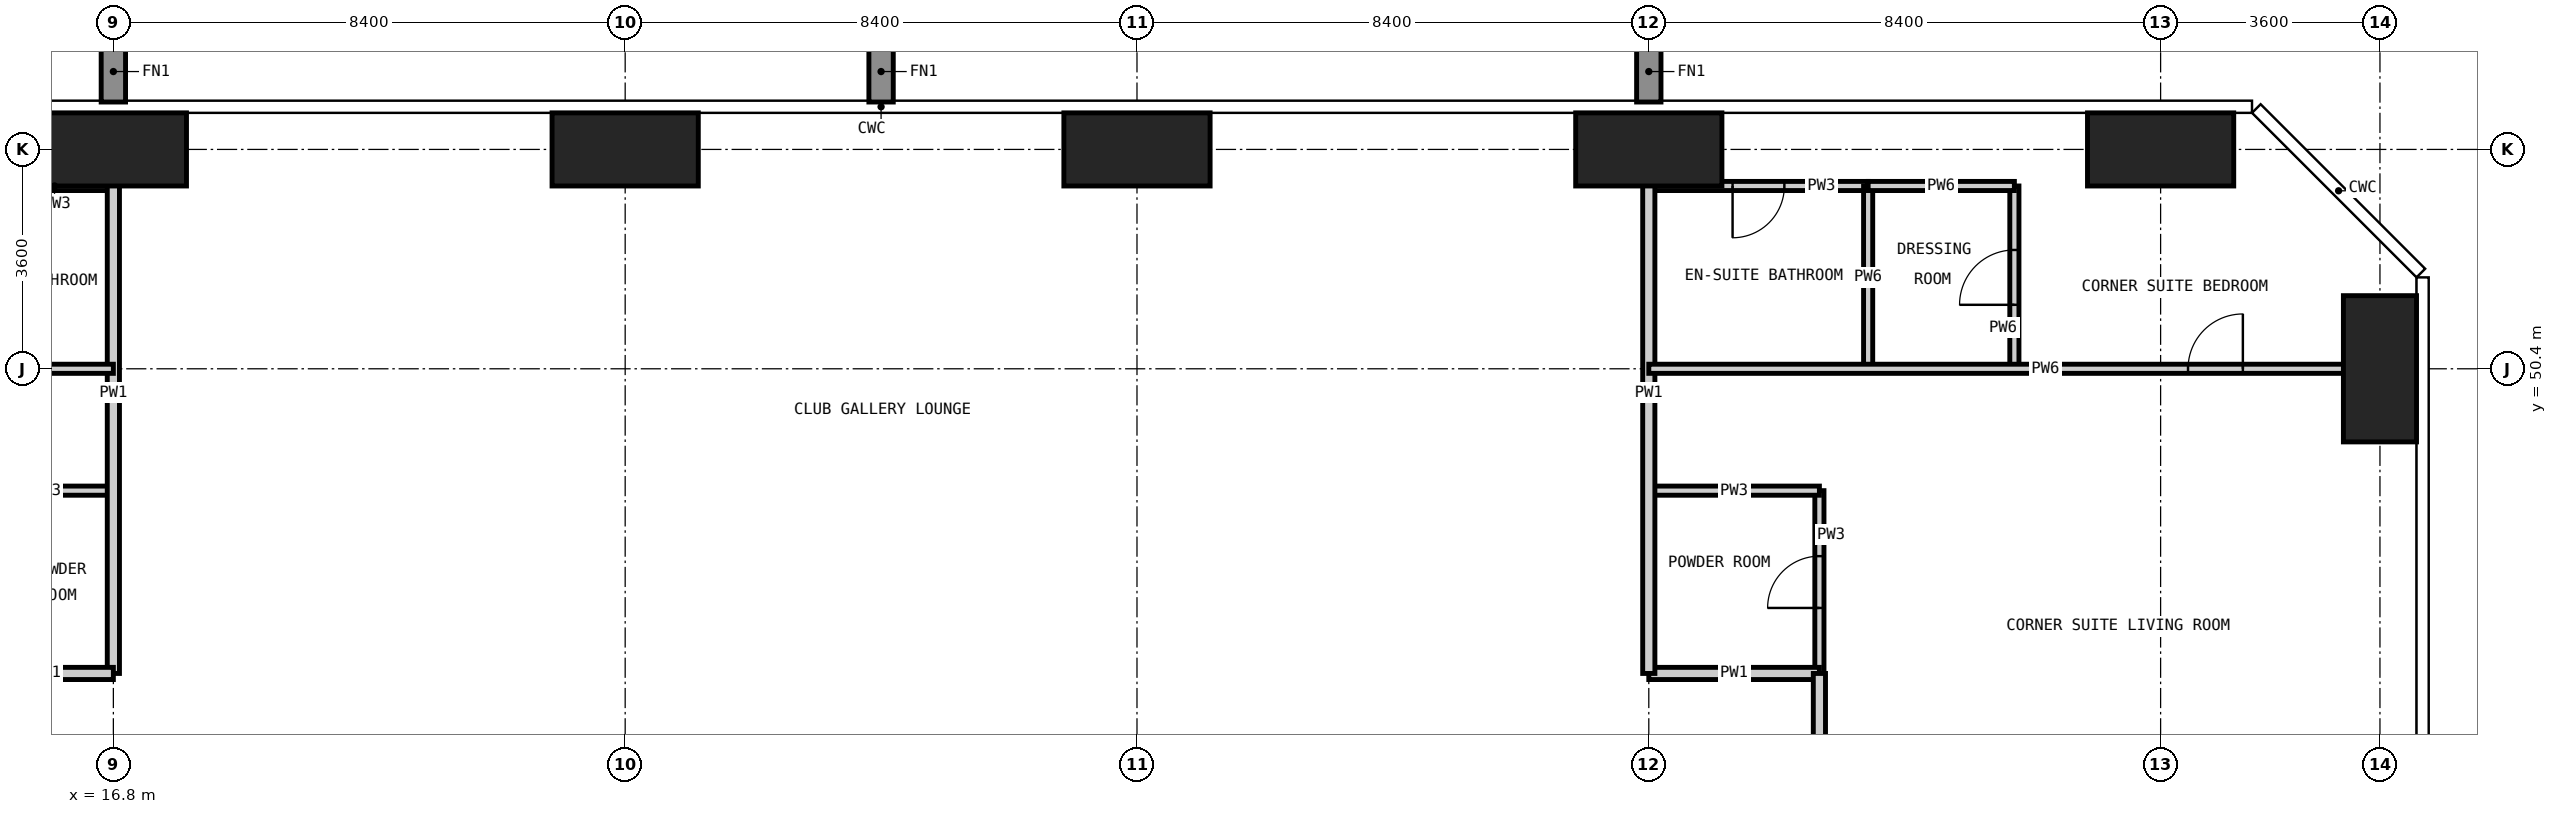
"""IFC4 building model, lengths in metres.
Left out: names, types, materials, properties, quantities, classifications, styles, units other than length and angle.
Written with IfcOpenShell. Run it as: python <this file> out.ifc"""

import sys

from ifc_helpers import new_model, si_unit, direction, frame, frame_2d, origin, origin_2d, place, context, subcontext, project, spatial, rectangle, extrude, element, fill, save


model = new_model("IFC4")
c1 = context("Model", 3, precision=1e-05, world=origin(), true_north=direction((0.0, 1.0)))
c2 = subcontext(c1, "Body", "Model", "MODEL_VIEW")
j1 = project(units=[si_unit("LENGTHUNIT", "METRE"), si_unit("PLANEANGLEUNIT", "RADIAN")], contexts=[c1])
p1 = place(None, origin())
s1 = spatial("IfcSite", under=j1, at=p1, CompositionType="ELEMENT")
p2 = place(p1, origin())
s2 = spatial("IfcBuilding", under=s1, at=p2, CompositionType="ELEMENT")
p3 = place(p2, frame((0.0, 0.0, 205.8)))
s3 = spatial("IfcBuildingStorey", under=s2, at=p3, CompositionType="ELEMENT", Elevation=205.8)
for number, where, z_axis, x_axis in (
    (1, (16.8, 54.0, -0.35), (0.0, 0.0, 1.0), (1.0, 0.0, 0.0)),
    (2, (25.2, 54.0, -0.35), (0.0, 0.0, 1.0), (1.0, 0.0, 0.0)),
    (3, (33.6, 54.0, -0.35), (0.0, 0.0, 1.0), (1.0, 0.0, 0.0)),
    (4, (42.0, 54.0, -0.35), (0.0, 0.0, 1.0), (1.0, 0.0, 0.0)),
    (5, (50.4, 54.0, -0.35), (0.0, 0.0, 1.0), (1.0, 0.0, 0.0)),
):
    element("IfcColumn", number, at=place(p3, frame(where, z_axis=z_axis, x_axis=x_axis)), inside=s3, PredefinedType="COLUMN", context=c2, shape_type="SweptSolid", body=[
        extrude(rectangle(XDim=2.4, YDim=1.2, at=origin_2d()), origin(), (0.0, 0.0, 1.0), 3.6),
    ])
p4 = place(p3, frame((54.0, 50.4, -0.35), z_axis=(0.0, 0.0, 1.0), x_axis=(1.0, 0.0, 0.0)))
e6 = element("IfcColumn", 6, at=p4, inside=s3, PredefinedType="COLUMN", context=c2, shape_type="SweptSolid", body=[
    extrude(rectangle(XDim=1.2, YDim=2.4, at=origin_2d()), origin(), (0.0, 0.0, 1.0), 3.6),
])
p5 = place(p3, frame((44.8, 45.4, 0.0), z_axis=(0.0, 0.0, 1.0), x_axis=(0.0, 1.0, 0.0)))
e7 = element("IfcWall", 7, at=p5, inside=s3, PredefinedType="PARTITIONING", context=c2, shape_type="SweptSolid", body=[
    extrude(rectangle(XDim=3.0, YDim=0.15, at=frame_2d((1.5, 0.0))), origin(), (0.0, 0.0, 1.0), 3.25),
])
p6 = place(p5, frame((1.075, 0.0, 0.0)))
e8 = element("IfcOpeningElement", 8, at=p6, cuts=e7, PredefinedType="OPENING", context=c2, shape_type="SweptSolid", body=[
    extrude(rectangle(XDim=0.85, YDim=2.1, at=frame_2d((0.425, 1.05))), frame((0.0, 0.085, 0.0), z_axis=(0.0, -1.0, 0.0), x_axis=(1.0, 0.0, 0.0)), (0.0, 0.0, 1.0), 0.17),
])
p7 = place(p3, frame((14.6, 48.4, 0.0), z_axis=(0.0, 0.0, 1.0), x_axis=(1.0, 0.0, 0.0)))
e9 = element("IfcWall", 9, at=p7, inside=s3, PredefinedType="PARTITIONING", context=c2, shape_type="SweptSolid", body=[
    extrude(rectangle(XDim=2.2, YDim=0.15, at=frame_2d((1.1, 0.0))), origin(), (0.0, 0.0, 1.0), 3.25),
])
p8 = place(p3, frame((42.0, 48.4, 0.0), z_axis=(0.0, 0.0, 1.0), x_axis=(1.0, 0.0, 0.0)))
e10 = element("IfcWall", 10, at=p8, inside=s3, PredefinedType="PARTITIONING", context=c2, shape_type="SweptSolid", body=[
    extrude(rectangle(XDim=2.8, YDim=0.15, at=frame_2d((1.4, 0.0))), origin(), (0.0, 0.0, 1.0), 3.25),
])
p9 = place(p3, frame((13.2, 53.4, 0.0), z_axis=(0.0, 0.0, 1.0), x_axis=(1.0, 0.0, 0.0)))
e11 = element("IfcWall", 11, at=p9, inside=s3, PredefinedType="PARTITIONING", context=c2, shape_type="SweptSolid", body=[
    extrude(rectangle(XDim=3.6, YDim=0.15, at=frame_2d((1.8, 0.0))), origin(), (0.0, 0.0, 1.0), 3.25),
])
p10 = place(p9, frame((1.375, 0.0, 0.0)))
e12 = element("IfcOpeningElement", 12, at=p10, cuts=e11, PredefinedType="OPENING", context=c2, shape_type="SweptSolid", body=[
    extrude(rectangle(XDim=0.85, YDim=2.1, at=frame_2d((0.425, 1.05))), frame((0.0, 0.085, 0.0), z_axis=(0.0, -1.0, 0.0), x_axis=(1.0, 0.0, 0.0)), (0.0, 0.0, 1.0), 0.17),
])
p11 = place(p3, frame((42.0, 53.4, 0.0), z_axis=(0.0, 0.0, 1.0), x_axis=(1.0, 0.0, 0.0)))
e13 = element("IfcWall", 13, at=p11, inside=s3, PredefinedType="PARTITIONING", context=c2, shape_type="SweptSolid", body=[
    extrude(rectangle(XDim=3.6, YDim=0.15, at=frame_2d((1.8, 0.0))), origin(), (0.0, 0.0, 1.0), 3.25),
])
p12 = place(p11, frame((1.375, 0.0, 0.0)))
e14 = element("IfcOpeningElement", 14, at=p12, cuts=e13, PredefinedType="OPENING", context=c2, shape_type="SweptSolid", body=[
    extrude(rectangle(XDim=0.85, YDim=2.1, at=frame_2d((0.425, 1.05))), frame((0.0, 0.085, 0.0), z_axis=(0.0, -1.0, 0.0), x_axis=(1.0, 0.0, 0.0)), (0.0, 0.0, 1.0), 0.17),
])
p13 = place(p3, frame((16.8, 45.4, 0.0), z_axis=(0.0, 0.0, 1.0), x_axis=(0.0, 1.0, 0.0)))
e15 = element("IfcWall", 15, at=p13, inside=s3, PredefinedType="PARTITIONING", context=c2, shape_type="SweptSolid", body=[
    extrude(rectangle(XDim=9.218, YDim=0.2, at=frame_2d((4.609, 0.0))), origin(), (0.0, 0.0, 1.0), 3.25),
])
p14 = place(p3, frame((14.6, 45.4, 0.0), z_axis=(0.0, 0.0, 1.0), x_axis=(1.0, 0.0, 0.0)))
e16 = element("IfcWall", 16, at=p14, inside=s3, PredefinedType="PARTITIONING", context=c2, shape_type="SweptSolid", body=[
    extrude(rectangle(XDim=2.2, YDim=0.2, at=frame_2d((1.1, 0.0))), origin(), (0.0, 0.0, 1.0), 3.25),
])
p15 = place(p3, frame((42.0, 45.4, 0.0), z_axis=(0.0, 0.0, 1.0), x_axis=(1.0, 0.0, 0.0)))
e17 = element("IfcWall", 17, at=p15, inside=s3, PredefinedType="PARTITIONING", context=c2, shape_type="SweptSolid", body=[
    extrude(rectangle(XDim=2.8, YDim=0.2, at=frame_2d((1.4, 0.0))), origin(), (0.0, 0.0, 1.0), 3.25),
])
p16 = place(p3, frame((42.0, 54.618, 0.0), z_axis=(0.0, 0.0, 1.0), x_axis=(0.0, -1.0, 0.0)))
e18 = element("IfcWall", 18, at=p16, inside=s3, PredefinedType="PARTITIONING", context=c2, shape_type="SweptSolid", body=[
    extrude(rectangle(XDim=9.218, YDim=0.2, at=frame_2d((4.609, 0.0))), origin(), (0.0, 0.0, 1.0), 3.25),
])
p17 = place(p3, frame((44.8, 45.4, 0.0), z_axis=(0.0, 0.0, 1.0), x_axis=(0.0, -1.0, 0.0)))
e19 = element("IfcWall", 19, at=p17, inside=s3, PredefinedType="PARTITIONING", context=c2, shape_type="SweptSolid", body=[
    extrude(rectangle(XDim=30.8, YDim=0.2, at=frame_2d((15.4, 0.0))), origin(), (0.0, 0.0, 1.0), 3.25),
])
p18 = place(p17, frame((26.0, 0.0, 0.0)))
e20 = element("IfcOpeningElement", 20, at=p18, cuts=e19, PredefinedType="OPENING", context=c2, shape_type="SweptSolid", body=[
    extrude(rectangle(XDim=1.0, YDim=2.2, at=frame_2d((0.5, 1.1))), frame((0.0, 0.11, 0.0), z_axis=(0.0, -1.0, 0.0), x_axis=(1.0, 0.0, 0.0)), (0.0, 0.0, 1.0), 0.22),
])
p19 = place(p17, frame((21.8, 0.0, 0.0)))
e21 = element("IfcOpeningElement", 21, at=p19, cuts=e19, PredefinedType="OPENING", context=c2, shape_type="SweptSolid", body=[
    extrude(rectangle(XDim=1.0, YDim=2.2, at=frame_2d((0.5, 1.1))), frame((0.0, 0.11, 0.0), z_axis=(0.0, -1.0, 0.0), x_axis=(1.0, 0.0, 0.0)), (0.0, 0.0, 1.0), 0.22),
])
p20 = place(p17, frame((16.7, 0.0, 0.0)))
e22 = element("IfcOpeningElement", 22, at=p20, cuts=e19, PredefinedType="OPENING", context=c2, shape_type="SweptSolid", body=[
    extrude(rectangle(XDim=1.0, YDim=2.2, at=frame_2d((0.5, 1.1))), frame((0.0, 0.11, 0.0), z_axis=(0.0, -1.0, 0.0), x_axis=(1.0, 0.0, 0.0)), (0.0, 0.0, 1.0), 0.22),
])
p21 = place(p17, frame((5.0, 0.0, 0.0)))
e23 = element("IfcOpeningElement", 23, at=p21, cuts=e19, PredefinedType="OPENING", context=c2, shape_type="SweptSolid", body=[
    extrude(rectangle(XDim=1.0, YDim=2.2, at=frame_2d((0.5, 1.1))), frame((0.0, 0.11, 0.0), z_axis=(0.0, -1.0, 0.0), x_axis=(1.0, 0.0, 0.0)), (0.0, 0.0, 1.0), 0.22),
])
p22 = place(p17, frame((29.2, 0.0, 0.0)))
e24 = element("IfcOpeningElement", 24, at=p22, cuts=e19, PredefinedType="OPENING", context=c2, shape_type="SweptSolid", body=[
    extrude(rectangle(XDim=1.0, YDim=2.2, at=frame_2d((0.5, 1.1))), frame((0.0, 0.11, 0.0), z_axis=(0.0, -1.0, 0.0), x_axis=(1.0, 0.0, 0.0)), (0.0, 0.0, 1.0), 0.22),
])
p23 = place(p17, frame((1.2, 0.0, 0.0)))
e25 = element("IfcOpeningElement", 25, at=p23, cuts=e19, PredefinedType="OPENING", context=c2, shape_type="SweptSolid", body=[
    extrude(rectangle(XDim=1.0, YDim=2.2, at=frame_2d((0.5, 1.1))), frame((0.0, 0.11, 0.0), z_axis=(0.0, -1.0, 0.0), x_axis=(1.0, 0.0, 0.0)), (0.0, 0.0, 1.0), 0.22),
])
p24 = place(p3, frame((45.6, 50.4, 0.0), z_axis=(0.0, 0.0, 1.0), x_axis=(0.0, 1.0, 0.0)))
e26 = element("IfcWall", 26, at=p24, inside=s3, PredefinedType="PARTITIONING", context=c2, shape_type="SweptSolid", body=[
    extrude(rectangle(XDim=3.0, YDim=0.15, at=frame_2d((1.5, 0.0))), origin(), (0.0, 0.0, 1.0), 3.25),
])
p25 = place(p3, frame((48.0, 50.4, 0.0), z_axis=(0.0, 0.0, 1.0), x_axis=(0.0, 1.0, 0.0)))
e27 = element("IfcWall", 27, at=p25, inside=s3, PredefinedType="PARTITIONING", context=c2, shape_type="SweptSolid", body=[
    extrude(rectangle(XDim=3.0, YDim=0.15, at=frame_2d((1.5, 0.0))), origin(), (0.0, 0.0, 1.0), 3.25),
])
p26 = place(p25, frame((1.05, 0.0, 0.0)))
e28 = element("IfcOpeningElement", 28, at=p26, cuts=e27, PredefinedType="OPENING", context=c2, shape_type="SweptSolid", body=[
    extrude(rectangle(XDim=0.9, YDim=2.1, at=frame_2d((0.45, 1.05))), frame((0.0, 0.085, 0.0), z_axis=(0.0, -1.0, 0.0), x_axis=(1.0, 0.0, 0.0)), (0.0, 0.0, 1.0), 0.17),
])
p27 = place(p3, frame((4.182, 50.4, 0.0), z_axis=(0.0, 0.0, 1.0), x_axis=(1.0, 0.0, 0.0)))
e29 = element("IfcWall", 29, at=p27, inside=s3, PredefinedType="PARTITIONING", context=c2, shape_type="SweptSolid", body=[
    extrude(rectangle(XDim=12.618, YDim=0.15, at=frame_2d((6.309, 0.0))), origin(), (0.0, 0.0, 1.0), 3.25),
])
p28 = place(p27, frame((2.868, 0.0, 0.0)))
e30 = element("IfcOpeningElement", 30, at=p28, cuts=e29, PredefinedType="OPENING", context=c2, shape_type="SweptSolid", body=[
    extrude(rectangle(XDim=0.9, YDim=2.1, at=frame_2d((0.45, 1.05))), frame((0.0, 0.085, 0.0), z_axis=(0.0, -1.0, 0.0), x_axis=(1.0, 0.0, 0.0)), (0.0, 0.0, 1.0), 0.17),
])
p29 = place(p3, frame((42.0, 50.4, 0.0), z_axis=(0.0, 0.0, 1.0), x_axis=(1.0, 0.0, 0.0)))
e31 = element("IfcWall", 31, at=p29, inside=s3, PredefinedType="PARTITIONING", context=c2, shape_type="SweptSolid", body=[
    extrude(rectangle(XDim=12.618, YDim=0.15, at=frame_2d((6.309, 0.0))), origin(), (0.0, 0.0, 1.0), 3.25),
])
p30 = place(p29, frame((8.85, 0.0, 0.0)))
e32 = element("IfcOpeningElement", 32, at=p30, cuts=e31, PredefinedType="OPENING", context=c2, shape_type="SweptSolid", body=[
    extrude(rectangle(XDim=0.9, YDim=2.1, at=frame_2d((0.45, 1.05))), frame((0.0, 0.085, 0.0), z_axis=(0.0, -1.0, 0.0), x_axis=(1.0, 0.0, 0.0)), (0.0, 0.0, 1.0), 0.17),
])
p31 = place(p3, frame((45.6, 53.4, 0.0), z_axis=(0.0, 0.0, 1.0), x_axis=(1.0, 0.0, 0.0)))
e33 = element("IfcWall", 33, at=p31, inside=s3, PredefinedType="PARTITIONING", context=c2, shape_type="SweptSolid", body=[
    extrude(rectangle(XDim=2.4, YDim=0.15, at=frame_2d((1.2, 0.0))), origin(), (0.0, 0.0, 1.0), 3.25),
])
p32 = place(p6, origin())
e34 = element("IfcDoor", 34, at=p32, inside=s3, OperationType="SINGLE_SWING_LEFT", PredefinedType="DOOR", context=c2, shape_type="SweptSolid", body=[
    extrude(rectangle(XDim=0.85, YDim=2.1, at=frame_2d((0.425, 1.05))), frame((0.0, 0.025, 0.0), z_axis=(0.0, -1.0, 0.0), x_axis=(1.0, 0.0, 0.0)), (0.0, 0.0, 1.0), 0.05),
])
fill(e8, e34)
p33 = place(p30, origin())
e35 = element("IfcDoor", 35, at=p33, inside=s3, OperationType="SINGLE_SWING_RIGHT", PredefinedType="DOOR", context=c2, shape_type="SweptSolid", body=[
    extrude(rectangle(XDim=0.9, YDim=2.1, at=frame_2d((0.45, 1.05))), frame((0.0, 0.025, 0.0), z_axis=(0.0, -1.0, 0.0), x_axis=(1.0, 0.0, 0.0)), (0.0, 0.0, 1.0), 0.05),
])
fill(e32, e35)
p34 = place(p12, frame((0.85, 0.0, 0.0), z_axis=(0.0, 0.0, 1.0), x_axis=(-1.0, 0.0, 0.0)))
e36 = element("IfcDoor", 36, at=p34, inside=s3, OperationType="SINGLE_SWING_RIGHT", PredefinedType="DOOR", context=c2, shape_type="SweptSolid", body=[
    extrude(rectangle(XDim=0.85, YDim=2.1, at=frame_2d((0.425, 1.05))), frame((0.0, 0.025, 0.0), z_axis=(0.0, -1.0, 0.0), x_axis=(1.0, 0.0, 0.0)), (0.0, 0.0, 1.0), 0.05),
])
fill(e14, e36)
p35 = place(p26, origin())
e37 = element("IfcDoor", 37, at=p35, inside=s3, OperationType="SINGLE_SWING_LEFT", PredefinedType="DOOR", context=c2, shape_type="SweptSolid", body=[
    extrude(rectangle(XDim=0.9, YDim=2.1, at=frame_2d((0.45, 1.05))), frame((0.0, 0.025, 0.0), z_axis=(0.0, -1.0, 0.0), x_axis=(1.0, 0.0, 0.0)), (0.0, 0.0, 1.0), 0.05),
])
fill(e28, e37)
save(model, sys.argv[1])
